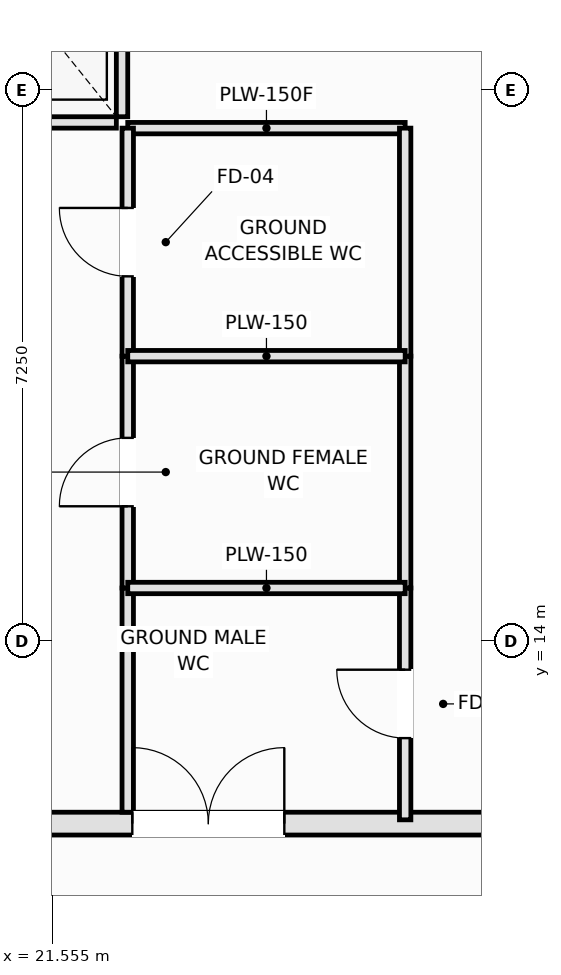
"""IFC4 building model, lengths in metres.
Left out: names, types, materials, properties, quantities, classifications, styles, units other than length and angle.
Written with IfcOpenShell. Run it as: python <this file> out.ifc"""

import sys

from ifc_helpers import new_model, si_unit, direction, frame, frame_2d, origin, place, context, subcontext, project, spatial, rectangle, extrude, element, fill, save


model = new_model("IFC4")
c1 = context("Model", 3, precision=1e-05, world=origin(), true_north=direction((0.0, 1.0)))
c2 = subcontext(c1, "Body", "Model", "MODEL_VIEW")
j1 = project(units=[si_unit("LENGTHUNIT", "METRE"), si_unit("PLANEANGLEUNIT", "RADIAN")], contexts=[c1])
p1 = place(None, origin())
s1 = spatial("IfcSite", under=j1, at=p1, CompositionType="ELEMENT")
p2 = place(p1, origin())
s2 = spatial("IfcBuilding", under=s1, at=p2, CompositionType="ELEMENT")
p3 = place(p2, origin())
s3 = spatial("IfcBuildingStorey", under=s2, at=p3, CompositionType="ELEMENT", Elevation=0.0)
p4 = place(p3, frame((21.31, 11.6, 0.0), z_axis=(0.0, 0.0, 1.0), x_axis=(1.0, 0.0, 0.0)))
e1 = element("IfcWall", 1, at=p4, inside=s3, PredefinedType="SOLIDWALL", context=c2, shape_type="SweptSolid", body=[
    extrude(rectangle(XDim=13.89, YDim=0.3, at=frame_2d((6.945, 0.0))), origin(), (0.0, 0.0, 1.0), 5.8),
])
p5 = place(p4, frame((1.3, 0.0, 0.0)))
e2 = element("IfcOpeningElement", 2, at=p5, cuts=e1, PredefinedType="OPENING", context=c2, shape_type="SweptSolid", body=[
    extrude(rectangle(XDim=2.0, YDim=2.4, at=frame_2d((1.0, 1.2))), frame((0.0, 0.16, 0.0), z_axis=(0.0, -1.0, 0.0), x_axis=(1.0, 0.0, 0.0)), (0.0, 0.0, 1.0), 0.32),
])
p6 = place(p4, frame((10.5, 0.0, 0.0)))
e3 = element("IfcOpeningElement", 3, at=p6, cuts=e1, PredefinedType="OPENING", context=c2, shape_type="SweptSolid", body=[
    extrude(rectangle(XDim=2.0, YDim=2.4, at=frame_2d((1.0, 1.2))), frame((0.0, 0.16, 0.0), z_axis=(0.0, -1.0, 0.0), x_axis=(1.0, 0.0, 0.0)), (0.0, 0.0, 1.0), 0.32),
])
p7 = place(p3, frame((20.35, 20.825, 0.0), z_axis=(0.0, 0.0, 1.0), x_axis=(1.0, 0.0, 0.0)))
e4 = element("IfcWall", 4, at=p7, inside=s3, PredefinedType="PARTITIONING", context=c2, shape_type="SweptSolid", body=[
    extrude(rectangle(XDim=2.05, YDim=0.15, at=frame_2d((1.025, 0.0))), origin(), (0.0, 0.0, 1.0), 5.8),
])
p8 = place(p3, frame((22.475, 20.9, 0.0), z_axis=(0.0, 0.0, 1.0), x_axis=(0.0, 1.0, 0.0)))
e5 = element("IfcWall", 5, at=p8, inside=s3, PredefinedType="PARTITIONING", context=c2, shape_type="SweptSolid", body=[
    extrude(rectangle(XDim=2.55, YDim=0.15, at=frame_2d((1.275, 0.0))), origin(), (0.0, 0.0, 1.0), 5.8),
])
p9 = place(p3, frame((22.55, 20.75, 0.0), z_axis=(0.0, 0.0, 1.0), x_axis=(1.0, 0.0, 0.0)))
e6 = element("IfcWall", 6, at=p9, inside=s3, PredefinedType="PLUMBINGWALL", context=c2, shape_type="SweptSolid", body=[
    extrude(rectangle(XDim=3.65, YDim=0.15, at=frame_2d((1.825, 0.0))), origin(), (0.0, 0.0, 1.0), 5.8),
])
p10 = place(p3, frame((26.2, 11.65, 0.0), z_axis=(0.0, 0.0, 1.0), x_axis=(0.0, 1.0, 0.0)))
e7 = element("IfcWall", 7, at=p10, inside=s3, PredefinedType="PLUMBINGWALL", context=c2, shape_type="SweptSolid", body=[
    extrude(rectangle(XDim=3.05, YDim=0.15, at=frame_2d((1.525, 0.0))), origin(), (0.0, 0.0, 1.0), 5.8),
])
p11 = place(p10, frame((1.075, 0.0, 0.0)))
e8 = element("IfcOpeningElement", 8, at=p11, cuts=e7, PredefinedType="OPENING", context=c2, shape_type="SweptSolid", body=[
    extrude(rectangle(XDim=0.9, YDim=2.1, at=frame_2d((0.45, 1.05))), frame((0.0, 0.085, 0.0), z_axis=(0.0, -1.0, 0.0), x_axis=(1.0, 0.0, 0.0)), (0.0, 0.0, 1.0), 0.17),
])
p12 = place(p3, frame((26.2, 14.7, 0.0), z_axis=(0.0, 0.0, 1.0), x_axis=(0.0, 1.0, 0.0)))
e9 = element("IfcWall", 9, at=p12, inside=s3, PredefinedType="PLUMBINGWALL", context=c2, shape_type="SweptSolid", body=[
    extrude(rectangle(XDim=3.05, YDim=0.15, at=frame_2d((1.525, 0.0))), origin(), (0.0, 0.0, 1.0), 5.8),
])
p13 = place(p3, frame((26.2, 17.75, 0.0), z_axis=(0.0, 0.0, 1.0), x_axis=(0.0, 1.0, 0.0)))
e10 = element("IfcWall", 10, at=p13, inside=s3, PredefinedType="PLUMBINGWALL", context=c2, shape_type="SweptSolid", body=[
    extrude(rectangle(XDim=3.0, YDim=0.15, at=frame_2d((1.5, 0.0))), origin(), (0.0, 0.0, 1.0), 5.8),
])
p14 = place(p3, frame((22.55, 14.0, 0.0), z_axis=(0.0, 0.0, 1.0), x_axis=(0.0, 1.0, 0.0)))
e11 = element("IfcWall", 11, at=p14, inside=s3, PredefinedType="PLUMBINGWALL", context=c2, shape_type="SweptSolid", body=[
    extrude(rectangle(XDim=0.7, YDim=0.15, at=frame_2d((0.35, 0.0))), origin(), (0.0, 0.0, 1.0), 5.8),
])
p15 = place(p3, frame((22.55, 14.7, 0.0), z_axis=(0.0, 0.0, 1.0), x_axis=(0.0, 1.0, 0.0)))
e12 = element("IfcWall", 12, at=p15, inside=s3, PredefinedType="PLUMBINGWALL", context=c2, shape_type="SweptSolid", body=[
    extrude(rectangle(XDim=3.05, YDim=0.15, at=frame_2d((1.525, 0.0))), origin(), (0.0, 0.0, 1.0), 5.8),
])
p16 = place(p15, frame((1.075, 0.0, 0.0)))
e13 = element("IfcOpeningElement", 13, at=p16, cuts=e12, PredefinedType="OPENING", context=c2, shape_type="SweptSolid", body=[
    extrude(rectangle(XDim=0.9, YDim=2.1, at=frame_2d((0.45, 1.05))), frame((0.0, 0.085, 0.0), z_axis=(0.0, -1.0, 0.0), x_axis=(1.0, 0.0, 0.0)), (0.0, 0.0, 1.0), 0.17),
])
p17 = place(p3, frame((22.55, 17.75, 0.0), z_axis=(0.0, 0.0, 1.0), x_axis=(0.0, 1.0, 0.0)))
e14 = element("IfcWall", 14, at=p17, inside=s3, PredefinedType="PLUMBINGWALL", context=c2, shape_type="SweptSolid", body=[
    extrude(rectangle(XDim=3.0, YDim=0.15, at=frame_2d((1.5, 0.0))), origin(), (0.0, 0.0, 1.0), 5.8),
])
p18 = place(p17, frame((1.05, 0.0, 0.0)))
e15 = element("IfcOpeningElement", 15, at=p18, cuts=e14, PredefinedType="OPENING", context=c2, shape_type="SweptSolid", body=[
    extrude(rectangle(XDim=0.9, YDim=2.1, at=frame_2d((0.45, 1.05))), frame((0.0, 0.085, 0.0), z_axis=(0.0, -1.0, 0.0), x_axis=(1.0, 0.0, 0.0)), (0.0, 0.0, 1.0), 0.17),
])
p19 = place(p3, frame((22.55, 11.75, 0.0), z_axis=(0.0, 0.0, 1.0), x_axis=(0.0, 1.0, 0.0)))
e16 = element("IfcWall", 16, at=p19, inside=s3, PredefinedType="PLUMBINGWALL", context=c2, shape_type="SweptSolid", body=[
    extrude(rectangle(XDim=2.25, YDim=0.15, at=frame_2d((1.125, 0.0))), origin(), (0.0, 0.0, 1.0), 5.8),
])
for number, where, z_axis, x_axis in (
    (17, (22.55, 14.7, 0.0), (0.0, 0.0, 1.0), (1.0, 0.0, 0.0)),
    (18, (22.55, 17.75, 0.0), (0.0, 0.0, 1.0), (1.0, 0.0, 0.0)),
):
    element("IfcWall", number, at=place(p3, frame(where, z_axis=z_axis, x_axis=x_axis)), inside=s3, PredefinedType="PLUMBINGWALL", context=c2, shape_type="SweptSolid", body=[
        extrude(rectangle(XDim=3.65, YDim=0.15, at=frame_2d((1.825, 0.0))), origin(), (0.0, 0.0, 1.0), 5.8),
    ])
p20 = place(p5, frame((2.0, 0.0, 0.0), z_axis=(0.0, 0.0, 1.0), x_axis=(-1.0, 0.0, 0.0)))
e19 = element("IfcDoor", 19, at=p20, inside=s3, OperationType="DOUBLE_DOOR_SINGLE_SWING", PredefinedType="DOOR", context=c2, shape_type="SweptSolid", body=[
    extrude(rectangle(XDim=2.0, YDim=2.4, at=frame_2d((1.0, 1.2))), frame((0.0, 0.025, 0.0), z_axis=(0.0, -1.0, 0.0), x_axis=(1.0, 0.0, 0.0)), (0.0, 0.0, 1.0), 0.05),
])
fill(e2, e19)
p21 = place(p11, origin())
e20 = element("IfcDoor", 20, at=p21, inside=s3, OperationType="SINGLE_SWING_RIGHT", PredefinedType="DOOR", context=c2, shape_type="SweptSolid", body=[
    extrude(rectangle(XDim=0.9, YDim=2.1, at=frame_2d((0.45, 1.05))), frame((0.0, 0.025, 0.0), z_axis=(0.0, -1.0, 0.0), x_axis=(1.0, 0.0, 0.0)), (0.0, 0.0, 1.0), 0.05),
])
fill(e8, e20)
p22 = place(p16, origin())
e21 = element("IfcDoor", 21, at=p22, inside=s3, OperationType="SINGLE_SWING_LEFT", PredefinedType="DOOR", context=c2, shape_type="SweptSolid", body=[
    extrude(rectangle(XDim=0.9, YDim=2.1, at=frame_2d((0.45, 1.05))), frame((0.0, 0.025, 0.0), z_axis=(0.0, -1.0, 0.0), x_axis=(1.0, 0.0, 0.0)), (0.0, 0.0, 1.0), 0.05),
])
fill(e13, e21)
p23 = place(p18, origin())
e22 = element("IfcDoor", 22, at=p23, inside=s3, OperationType="SINGLE_SWING_RIGHT", PredefinedType="DOOR", context=c2, shape_type="SweptSolid", body=[
    extrude(rectangle(XDim=0.9, YDim=2.1, at=frame_2d((0.45, 1.05))), frame((0.0, 0.025, 0.0), z_axis=(0.0, -1.0, 0.0), x_axis=(1.0, 0.0, 0.0)), (0.0, 0.0, 1.0), 0.05),
])
fill(e15, e22)
save(model, sys.argv[1])
